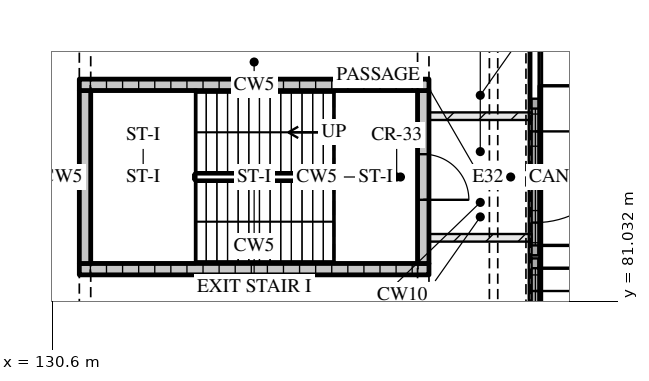
"""IFC4 building model, lengths in metres.
Left out: names, types, materials, properties, quantities, classifications, styles, units other than length and angle.
Written with IfcOpenShell. Run it as: python <this file> out.ifc"""

import sys

from ifc_helpers import new_model, si_unit, direction, frame, frame_2d, origin, place, context, subcontext, project, spatial, rectangle, extrude, element, fill, save


model = new_model("IFC4")
c1 = context("Model", 3, precision=1e-05, world=origin(), true_north=direction((0.0, 1.0)))
c2 = subcontext(c1, "Body", "Model", "MODEL_VIEW")
j1 = project(units=[si_unit("LENGTHUNIT", "METRE"), si_unit("PLANEANGLEUNIT", "RADIAN")], contexts=[c1])
p1 = place(None, origin())
s1 = spatial("IfcSite", under=j1, at=p1, CompositionType="ELEMENT")
p2 = place(p1, origin())
s2 = spatial("IfcBuilding", under=s1, at=p2, CompositionType="ELEMENT")
p3 = place(p2, origin())
s3 = spatial("IfcBuildingStorey", under=s2, at=p3, CompositionType="ELEMENT", Elevation=0.0)
p4 = place(p3, frame((143.3, 82.16, 0.0), z_axis=(0.0, 0.0, 1.0), x_axis=(0.0, -1.0, 0.0)))
e1 = element("IfcWall", 1, at=p4, inside=s3, PredefinedType="SOLIDWALL", context=c2, shape_type="SweptSolid", body=[
    extrude(rectangle(XDim=4.12, YDim=0.2, at=frame_2d((2.06, 0.0))), origin(), (0.0, 0.0, 1.0), 8.7),
])
p5 = place(p4, frame((0.86, 0.0, 0.0)))
e2 = element("IfcOpeningElement", 2, at=p5, cuts=e1, PredefinedType="OPENING", context=c2, shape_type="SweptSolid", body=[
    extrude(rectangle(XDim=2.4, YDim=2.4, at=frame_2d((1.2, 1.2))), frame((0.0, 0.11, 0.0), z_axis=(0.0, -1.0, 0.0), x_axis=(1.0, 0.0, 0.0)), (0.0, 0.0, 1.0), 0.22),
])
p6 = place(p4, frame((0.26, 0.0, 2.7)))
e3 = element("IfcOpeningElement", 3, at=p6, cuts=e1, PredefinedType="OPENING", context=c2, shape_type="SweptSolid", body=[
    extrude(rectangle(XDim=3.6, YDim=5.6, at=frame_2d((1.8, 2.8))), frame((0.0, 0.11, 0.0), z_axis=(0.0, -1.0, 0.0), x_axis=(1.0, 0.0, 0.0)), (0.0, 0.0, 1.0), 0.22),
])
p7 = place(p3, frame((143.3, 86.36, 0.0), z_axis=(0.0, 0.0, 1.0), x_axis=(0.0, -1.0, 0.0)))
e4 = element("IfcWall", 4, at=p7, inside=s3, PredefinedType="SOLIDWALL", context=c2, shape_type="SweptSolid", body=[
    extrude(rectangle(XDim=4.12, YDim=0.2, at=frame_2d((2.06, 0.0))), origin(), (0.0, 0.0, 1.0), 8.7),
])
p8 = place(p7, frame((0.86, 0.0, 0.0)))
e5 = element("IfcOpeningElement", 5, at=p8, cuts=e4, PredefinedType="OPENING", context=c2, shape_type="SweptSolid", body=[
    extrude(rectangle(XDim=2.4, YDim=2.4, at=frame_2d((1.2, 1.2))), frame((0.0, 0.11, 0.0), z_axis=(0.0, -1.0, 0.0), x_axis=(1.0, 0.0, 0.0)), (0.0, 0.0, 1.0), 0.22),
])
p9 = place(p7, frame((0.26, 0.0, 2.7)))
e6 = element("IfcOpeningElement", 6, at=p9, cuts=e4, PredefinedType="OPENING", context=c2, shape_type="SweptSolid", body=[
    extrude(rectangle(XDim=3.6, YDim=5.6, at=frame_2d((1.8, 2.8))), frame((0.0, 0.11, 0.0), z_axis=(0.0, -1.0, 0.0), x_axis=(1.0, 0.0, 0.0)), (0.0, 0.0, 1.0), 0.22),
])
p10 = place(p3, frame((131.3, 81.875, 0.0), z_axis=(0.0, 0.0, 1.0), x_axis=(1.0, 0.0, 0.0)))
e7 = element("IfcWall", 7, at=p10, inside=s3, PredefinedType="SOLIDWALL", context=c2, shape_type="SweptSolid", body=[
    extrude(rectangle(XDim=9.2, YDim=0.3, at=frame_2d((4.6, 0.0))), origin(), (0.0, 0.0, 1.0), 8.7),
])
p11 = place(p3, frame((131.45, 82.025, 0.0), z_axis=(0.0, 0.0, 1.0), x_axis=(0.0, 1.0, 0.0)))
e8 = element("IfcWall", 8, at=p11, inside=s3, PredefinedType="SOLIDWALL", context=c2, shape_type="SweptSolid", body=[
    extrude(rectangle(XDim=4.55, YDim=0.3, at=frame_2d((2.275, 0.0))), origin(), (0.0, 0.0, 1.0), 8.7),
])
p12 = place(p3, frame((140.35, 82.025, 0.0), z_axis=(0.0, 0.0, 1.0), x_axis=(0.0, 1.0, 0.0)))
e9 = element("IfcWall", 9, at=p12, inside=s3, PredefinedType="SOLIDWALL", context=c2, shape_type="SweptSolid", body=[
    extrude(rectangle(XDim=4.55, YDim=0.3, at=frame_2d((2.275, 0.0))), origin(), (0.0, 0.0, 1.0), 8.7),
])
p13 = place(p12, frame((1.675, 0.0, 0.0)))
e10 = element("IfcOpeningElement", 10, at=p13, cuts=e9, PredefinedType="OPENING", context=c2, shape_type="SweptSolid", body=[
    extrude(rectangle(XDim=1.2, YDim=2.1, at=frame_2d((0.6, 1.05))), frame((0.0, 0.16, 0.0), z_axis=(0.0, -1.0, 0.0), x_axis=(1.0, 0.0, 0.0)), (0.0, 0.0, 1.0), 0.32),
])
p14 = place(p3, frame((131.3, 86.725, 0.0), z_axis=(0.0, 0.0, 1.0), x_axis=(1.0, 0.0, 0.0)))
e11 = element("IfcWall", 11, at=p14, inside=s3, PredefinedType="SOLIDWALL", context=c2, shape_type="SweptSolid", body=[
    extrude(rectangle(XDim=9.2, YDim=0.3, at=frame_2d((4.6, 0.0))), origin(), (0.0, 0.0, 1.0), 8.7),
])
for number, where, z_axis, x_axis in (
    (12, (140.5, 82.7, 0.0), (0.0, 0.0, 1.0), (1.0, 0.0, 0.0)),
    (13, (140.5, 85.9, 0.0), (0.0, 0.0, 1.0), (1.0, 0.0, 0.0)),
):
    element("IfcWall", number, at=place(p3, frame(where, z_axis=z_axis, x_axis=x_axis)), inside=s3, PredefinedType="PARTITIONING", context=c2, shape_type="SweptSolid", body=[
        extrude(rectangle(XDim=2.7, YDim=0.2, at=frame_2d((1.35, 0.0))), origin(), (0.0, 0.0, 1.0), 8.7),
    ])
p15 = place(p5, origin())
e14 = element("IfcDoor", 14, at=p15, inside=s3, OperationType="DOUBLE_DOOR_SINGLE_SWING", PredefinedType="DOOR", context=c2, shape_type="SweptSolid", body=[
    extrude(rectangle(XDim=2.4, YDim=2.4, at=frame_2d((1.2, 1.2))), frame((0.0, 0.025, 0.0), z_axis=(0.0, -1.0, 0.0), x_axis=(1.0, 0.0, 0.0)), (0.0, 0.0, 1.0), 0.05),
])
fill(e2, e14)
p16 = place(p6, origin())
e15 = element("IfcWindow", 15, at=p16, inside=s3, PartitioningType="SINGLE_PANEL", PredefinedType="WINDOW", context=c2, shape_type="SweptSolid", body=[
    extrude(rectangle(XDim=3.6, YDim=5.6, at=frame_2d((1.8, 2.8))), frame((0.0, 0.03, 0.0), z_axis=(0.0, -1.0, 0.0), x_axis=(1.0, 0.0, 0.0)), (0.0, 0.0, 1.0), 0.06),
])
fill(e3, e15)
p17 = place(p8, origin())
e16 = element("IfcDoor", 16, at=p17, inside=s3, OperationType="DOUBLE_DOOR_SINGLE_SWING", PredefinedType="DOOR", context=c2, shape_type="SweptSolid", body=[
    extrude(rectangle(XDim=2.4, YDim=2.4, at=frame_2d((1.2, 1.2))), frame((0.0, 0.025, 0.0), z_axis=(0.0, -1.0, 0.0), x_axis=(1.0, 0.0, 0.0)), (0.0, 0.0, 1.0), 0.05),
])
fill(e5, e16)
p18 = place(p9, origin())
e17 = element("IfcWindow", 17, at=p18, inside=s3, PartitioningType="SINGLE_PANEL", PredefinedType="WINDOW", context=c2, shape_type="SweptSolid", body=[
    extrude(rectangle(XDim=3.6, YDim=5.6, at=frame_2d((1.8, 2.8))), frame((0.0, 0.03, 0.0), z_axis=(0.0, -1.0, 0.0), x_axis=(1.0, 0.0, 0.0)), (0.0, 0.0, 1.0), 0.06),
])
fill(e6, e17)
p19 = place(p13, origin())
e18 = element("IfcDoor", 18, at=p19, inside=s3, OperationType="SINGLE_SWING_RIGHT", PredefinedType="DOOR", context=c2, shape_type="SweptSolid", body=[
    extrude(rectangle(XDim=1.2, YDim=2.1, at=frame_2d((0.6, 1.05))), frame((0.0, 0.025, 0.0), z_axis=(0.0, -1.0, 0.0), x_axis=(1.0, 0.0, 0.0)), (0.0, 0.0, 1.0), 0.05),
])
fill(e10, e18)
save(model, sys.argv[1])
